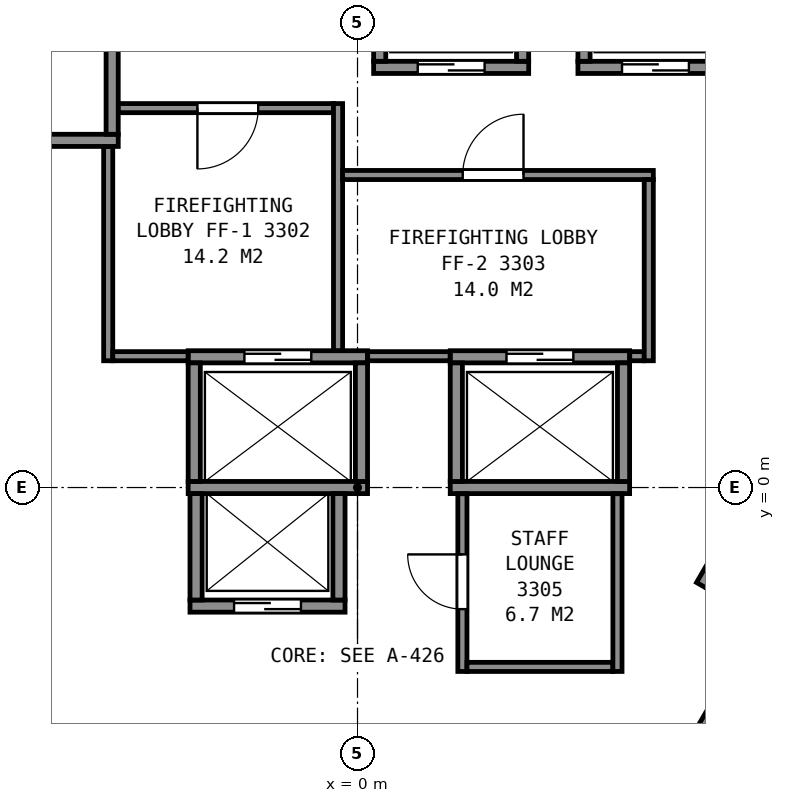
"""IFC4 building model, lengths in metres.
Left out: names, types, materials, properties, quantities, classifications, styles, units other than length and angle.
Written with IfcOpenShell. Run it as: python <this file> out.ifc"""

import sys

from ifc_helpers import new_model, si_unit, direction, frame, frame_2d, origin, place, context, subcontext, project, spatial, rectangle, extrude, element, fill, save


model = new_model("IFC4")
c1 = context("Model", 3, precision=1e-05, world=origin(), true_north=direction((0.0, 1.0)))
c2 = subcontext(c1, "Body", "Model", "MODEL_VIEW")
j1 = project(units=[si_unit("LENGTHUNIT", "METRE"), si_unit("PLANEANGLEUNIT", "RADIAN")], contexts=[c1])
p1 = place(None, origin())
s1 = spatial("IfcSite", under=j1, at=p1, CompositionType="ELEMENT")
p2 = place(p1, origin())
s2 = spatial("IfcBuilding", under=s1, at=p2, CompositionType="ELEMENT")
p3 = place(p2, frame((0.0, 0.0, 136.0)))
s3 = spatial("IfcBuildingStorey", under=s2, at=p3, CompositionType="ELEMENT", Elevation=136.0)
p4 = place(p3, frame((-2.755, -1.95, 0.0), z_axis=(0.0, 0.0, 1.0), x_axis=(1.0, 0.0, 0.0)))
e1 = element("IfcWall", 1, at=p4, inside=s3, PredefinedType="PARTITIONING", context=c2, shape_type="SweptSolid", body=[
    extrude(rectangle(XDim=2.55, YDim=0.2, at=frame_2d((1.275, 0.0))), origin(), (0.0, 0.0, 1.0), 3.6),
])
p5 = place(p4, frame((0.725, 0.0, 0.0)))
e2 = element("IfcOpeningElement", 2, at=p5, cuts=e1, PredefinedType="OPENING", context=c2, shape_type="SweptSolid", body=[
    extrude(rectangle(XDim=1.1, YDim=2.1, at=frame_2d((0.55, 1.05))), frame((0.0, 0.11, 0.0), z_axis=(0.0, -1.0, 0.0), x_axis=(1.0, 0.0, 0.0)), (0.0, 0.0, 1.0), 0.22),
])
p6 = place(p3, frame((-2.785, 0.0, 0.0), z_axis=(0.0, 0.0, 1.0), x_axis=(1.0, 0.0, 0.0)))
e3 = element("IfcWall", 3, at=p6, inside=s3, PredefinedType="PARTITIONING", context=c2, shape_type="SweptSolid", body=[
    extrude(rectangle(XDim=2.95, YDim=0.2, at=frame_2d((1.475, 0.0))), origin(), (0.0, 0.0, 1.0), 3.6),
])
p7 = place(p3, frame((1.525, 0.0, 0.0), z_axis=(0.0, 0.0, 1.0), x_axis=(1.0, 0.0, 0.0)))
e4 = element("IfcWall", 4, at=p7, inside=s3, PredefinedType="PARTITIONING", context=c2, shape_type="SweptSolid", body=[
    extrude(rectangle(XDim=2.95, YDim=0.2, at=frame_2d((1.475, 0.0))), origin(), (0.0, 0.0, 1.0), 3.6),
])
p8 = place(p3, frame((-2.785, 2.15, 0.0), z_axis=(0.0, 0.0, 1.0), x_axis=(1.0, 0.0, 0.0)))
e5 = element("IfcWall", 5, at=p8, inside=s3, PredefinedType="PARTITIONING", context=c2, shape_type="SweptSolid", body=[
    extrude(rectangle(XDim=2.95, YDim=0.2, at=frame_2d((1.475, 0.0))), origin(), (0.0, 0.0, 1.0), 3.6),
])
p9 = place(p8, frame((0.925, 0.0, 0.0)))
e6 = element("IfcOpeningElement", 6, at=p9, cuts=e5, PredefinedType="OPENING", context=c2, shape_type="SweptSolid", body=[
    extrude(rectangle(XDim=1.1, YDim=2.1, at=frame_2d((0.55, 1.05))), frame((0.0, 0.11, 0.0), z_axis=(0.0, -1.0, 0.0), x_axis=(1.0, 0.0, 0.0)), (0.0, 0.0, 1.0), 0.22),
])
p10 = place(p3, frame((1.525, 2.15, 0.0), z_axis=(0.0, 0.0, 1.0), x_axis=(1.0, 0.0, 0.0)))
e7 = element("IfcWall", 7, at=p10, inside=s3, PredefinedType="PARTITIONING", context=c2, shape_type="SweptSolid", body=[
    extrude(rectangle(XDim=2.95, YDim=0.2, at=frame_2d((1.475, 0.0))), origin(), (0.0, 0.0, 1.0), 3.6),
])
p11 = place(p10, frame((0.925, 0.0, 0.0)))
e8 = element("IfcOpeningElement", 8, at=p11, cuts=e7, PredefinedType="OPENING", context=c2, shape_type="SweptSolid", body=[
    extrude(rectangle(XDim=1.1, YDim=2.1, at=frame_2d((0.55, 1.05))), frame((0.0, 0.11, 0.0), z_axis=(0.0, -1.0, 0.0), x_axis=(1.0, 0.0, 0.0)), (0.0, 0.0, 1.0), 0.22),
])
p12 = place(p3, frame((-6.285, 5.71, 0.0), z_axis=(0.0, 0.0, 1.0), x_axis=(1.0, 0.0, 0.0)))
e9 = element("IfcWall", 9, at=p12, inside=s3, PredefinedType="PARTITIONING", context=c2, shape_type="SweptSolid", body=[
    extrude(rectangle(XDim=2.35, YDim=0.2, at=frame_2d((1.175, 0.0))), origin(), (0.0, 0.0, 1.0), 3.6),
])
p13 = place(p3, frame((0.265, 6.91, 0.0), z_axis=(0.0, 0.0, 1.0), x_axis=(1.0, 0.0, 0.0)))
e10 = element("IfcWall", 10, at=p13, inside=s3, PredefinedType="PARTITIONING", context=c2, shape_type="SweptSolid", body=[
    extrude(rectangle(XDim=2.55, YDim=0.2, at=frame_2d((1.275, 0.0))), origin(), (0.0, 0.0, 1.0), 3.6),
])
p14 = place(p13, frame((0.725, 0.0, 0.0)))
e11 = element("IfcOpeningElement", 11, at=p14, cuts=e10, PredefinedType="OPENING", context=c2, shape_type="SweptSolid", body=[
    extrude(rectangle(XDim=1.1, YDim=2.1, at=frame_2d((0.55, 1.05))), frame((0.0, 0.11, 0.0), z_axis=(0.0, -1.0, 0.0), x_axis=(1.0, 0.0, 0.0)), (0.0, 0.0, 1.0), 0.22),
])
p15 = place(p3, frame((3.625, 6.91, 0.0), z_axis=(0.0, 0.0, 1.0), x_axis=(1.0, 0.0, 0.0)))
e12 = element("IfcWall", 12, at=p15, inside=s3, PredefinedType="PARTITIONING", context=c2, shape_type="SweptSolid", body=[
    extrude(rectangle(XDim=2.55, YDim=0.2, at=frame_2d((1.275, 0.0))), origin(), (0.0, 0.0, 1.0), 3.6),
])
p16 = place(p15, frame((0.725, 0.0, 0.0)))
e13 = element("IfcOpeningElement", 13, at=p16, cuts=e12, PredefinedType="OPENING", context=c2, shape_type="SweptSolid", body=[
    extrude(rectangle(XDim=1.1, YDim=2.1, at=frame_2d((0.55, 1.05))), frame((0.0, 0.11, 0.0), z_axis=(0.0, -1.0, 0.0), x_axis=(1.0, 0.0, 0.0)), (0.0, 0.0, 1.0), 0.22),
])
p17 = place(p3, frame((5.527, -4.247, 0.0), z_axis=(0.0, 0.0, 1.0), x_axis=(0.499938297808, 0.866061024631, 0.0)))
e14 = element("IfcWall", 14, at=p17, inside=s3, PredefinedType="PARTITIONING", context=c2, shape_type="SweptSolid", body=[
    extrude(rectangle(XDim=2.35, YDim=0.2, at=frame_2d((1.175, 0.0))), origin(), (0.0, 0.0, 1.0), 3.6),
])
p18 = place(p17, frame((0.725, 0.0, 0.0)))
e15 = element("IfcOpeningElement", 15, at=p18, cuts=e14, PredefinedType="OPENING", context=c2, shape_type="SweptSolid", body=[
    extrude(rectangle(XDim=1.1, YDim=2.1, at=frame_2d((0.55, 1.05))), frame((0.0, 0.11, 0.0), z_axis=(0.0, -1.0, 0.0), x_axis=(1.0, 0.0, 0.0)), (0.0, 0.0, 1.0), 0.22),
])
p19 = place(p3, frame((5.663, -1.612, 0.0), z_axis=(0.0, 0.0, 1.0), x_axis=(0.49998122708, 0.866036242063, 0.0)))
e16 = element("IfcWall", 16, at=p19, inside=s3, PredefinedType="PARTITIONING", context=c2, shape_type="SweptSolid", body=[
    extrude(rectangle(XDim=4.9, YDim=0.2, at=frame_2d((2.45, 0.0))), origin(), (0.0, 0.0, 1.0), 3.6),
])
p20 = place(p3, frame((4.375, 0.1, 0.0), z_axis=(0.0, 0.0, 1.0), x_axis=(0.0, 1.0, 0.0)))
e17 = element("IfcWall", 17, at=p20, inside=s3, PredefinedType="PARTITIONING", context=c2, shape_type="SweptSolid", body=[
    extrude(rectangle(XDim=1.95, YDim=0.2, at=frame_2d((0.975, 0.0))), origin(), (0.0, 0.0, 1.0), 3.6),
])
for number, where, z_axis, x_axis in (
    (18, (3.725, 7.01, 0.0), (0.0, 0.0, 1.0), (0.0, 1.0, 0.0)),
    (19, (2.715, 7.01, 0.0), (0.0, 0.0, 1.0), (0.0, 1.0, 0.0)),
):
    element("IfcWall", number, at=place(p3, frame(where, z_axis=z_axis, x_axis=x_axis)), inside=s3, PredefinedType="PARTITIONING", context=c2, shape_type="SweptSolid", body=[
        extrude(rectangle(XDim=1.75, YDim=0.2, at=frame_2d((0.875, 0.0))), origin(), (0.0, 0.0, 1.0), 3.6),
    ])
p21 = place(p3, frame((1.625, 0.1, 0.0), z_axis=(0.0, 0.0, 1.0), x_axis=(0.0, 1.0, 0.0)))
e20 = element("IfcWall", 20, at=p21, inside=s3, PredefinedType="PARTITIONING", context=c2, shape_type="SweptSolid", body=[
    extrude(rectangle(XDim=1.95, YDim=0.2, at=frame_2d((0.975, 0.0))), origin(), (0.0, 0.0, 1.0), 3.6),
])
p22 = place(p3, frame((0.365, 7.01, 0.0), z_axis=(0.0, 0.0, 1.0), x_axis=(0.0, 1.0, 0.0)))
e21 = element("IfcWall", 21, at=p22, inside=s3, PredefinedType="PARTITIONING", context=c2, shape_type="SweptSolid", body=[
    extrude(rectangle(XDim=1.75, YDim=0.2, at=frame_2d((0.875, 0.0))), origin(), (0.0, 0.0, 1.0), 3.6),
])
p23 = place(p3, frame((0.065, 0.1, 0.0), z_axis=(0.0, 0.0, 1.0), x_axis=(0.0, 1.0, 0.0)))
e22 = element("IfcWall", 22, at=p23, inside=s3, PredefinedType="PARTITIONING", context=c2, shape_type="SweptSolid", body=[
    extrude(rectangle(XDim=1.95, YDim=0.2, at=frame_2d((0.975, 0.0))), origin(), (0.0, 0.0, 1.0), 3.6),
])
for number, where, z_axis, x_axis in (
    (23, (-0.305, -1.85, 0.0), (0.0, 0.0, 1.0), (0.0, 1.0, 0.0)),
    (24, (-2.655, -1.85, 0.0), (0.0, 0.0, 1.0), (0.0, 1.0, 0.0)),
):
    element("IfcWall", number, at=place(p3, frame(where, z_axis=z_axis, x_axis=x_axis)), inside=s3, PredefinedType="PARTITIONING", context=c2, shape_type="SweptSolid", body=[
        extrude(rectangle(XDim=1.75, YDim=0.2, at=frame_2d((0.875, 0.0))), origin(), (0.0, 0.0, 1.0), 3.6),
    ])
p24 = place(p3, frame((-2.685, 0.1, 0.0), z_axis=(0.0, 0.0, 1.0), x_axis=(0.0, 1.0, 0.0)))
e25 = element("IfcWall", 25, at=p24, inside=s3, PredefinedType="PARTITIONING", context=c2, shape_type="SweptSolid", body=[
    extrude(rectangle(XDim=1.95, YDim=0.2, at=frame_2d((0.975, 0.0))), origin(), (0.0, 0.0, 1.0), 3.6),
])
p25 = place(p3, frame((-4.035, 5.81, 0.0), z_axis=(0.0, 0.0, 1.0), x_axis=(0.0, 1.0, 0.0)))
e26 = element("IfcWall", 26, at=p25, inside=s3, PredefinedType="PARTITIONING", context=c2, shape_type="SweptSolid", body=[
    extrude(rectangle(XDim=1.75, YDim=0.2, at=frame_2d((0.875, 0.0))), origin(), (0.0, 0.0, 1.0), 3.6),
])
p26 = place(p3, frame((-13.664, 5.946, 0.0), z_axis=(0.0, 0.0, 1.0), x_axis=(0.499994327219, -0.866028678941, 0.0)))
e27 = element("IfcWall", 27, at=p26, inside=s3, PredefinedType="PARTITIONING", context=c2, shape_type="SweptSolid", body=[
    extrude(rectangle(XDim=23.968, YDim=0.2, at=frame_2d((11.984, 0.0))), origin(), (0.0, 0.0, 1.0), 3.35),
])
p27 = place(p3, frame((-4.152, -5.729, 0.0), z_axis=(0.0, 0.0, 1.0), x_axis=(-0.500024287448, 0.866011380966, 0.0)))
e28 = element("IfcWall", 28, at=p27, inside=s3, PredefinedType="PARTITIONING", context=c2, shape_type="SweptSolid", body=[
    extrude(rectangle(XDim=3.501, YDim=0.15, at=frame_2d((1.75, 0.0))), origin(), (0.0, 0.0, 1.0), 3.35),
])
p28 = place(p27, frame((2.026, 0.0, 0.0)))
e29 = element("IfcOpeningElement", 29, at=p28, cuts=e28, PredefinedType="OPENING", context=c2, shape_type="SweptSolid", body=[
    extrude(rectangle(XDim=0.9, YDim=2.1, at=frame_2d((0.45, 1.05))), frame((0.0, 0.085, 0.0), z_axis=(0.0, -1.0, 0.0), x_axis=(1.0, 0.0, 0.0)), (0.0, 0.0, 1.0), 0.17),
])
p29 = place(p27, frame((0.248, 0.0, 0.0)))
e30 = element("IfcOpeningElement", 30, at=p29, cuts=e28, PredefinedType="OPENING", context=c2, shape_type="SweptSolid", body=[
    extrude(rectangle(XDim=0.9, YDim=2.1, at=frame_2d((0.45, 1.05))), frame((0.0, 0.085, 0.0), z_axis=(0.0, -1.0, 0.0), x_axis=(1.0, 0.0, 0.0)), (0.0, 0.0, 1.0), 0.17),
])
p30 = place(p3, frame((-4.1, 2.085, 0.0), z_axis=(0.0, 0.0, 1.0), x_axis=(0.0, 1.0, 0.0)))
e31 = element("IfcWall", 31, at=p30, inside=s3, PredefinedType="PARTITIONING", context=c2, shape_type="SweptSolid", body=[
    extrude(rectangle(XDim=3.523, YDim=0.15, at=frame_2d((1.761, 0.0))), origin(), (0.0, 0.0, 1.0), 3.35),
])
p31 = place(p3, frame((-4.025, 2.16, 0.0), z_axis=(0.0, 0.0, 1.0), x_axis=(1.0, 0.0, 0.0)))
e32 = element("IfcWall", 32, at=p31, inside=s3, PredefinedType="PARTITIONING", context=c2, shape_type="SweptSolid", body=[
    extrude(rectangle(XDim=1.238, YDim=0.15, at=frame_2d((0.619, 0.0))), origin(), (0.0, 0.0, 1.0), 3.35),
])
p32 = place(p3, frame((-3.933, 6.24, 0.0), z_axis=(0.0, 0.0, 1.0), x_axis=(1.0, 0.0, 0.0)))
e33 = element("IfcWall", 33, at=p32, inside=s3, PredefinedType="PARTITIONING", context=c2, shape_type="SweptSolid", body=[
    extrude(rectangle(XDim=3.538, YDim=0.15, at=frame_2d((1.769, 0.0))), origin(), (0.0, 0.0, 1.0), 3.35),
])
p33 = place(p32, frame((1.3, 0.0, 0.0)))
e34 = element("IfcOpeningElement", 34, at=p33, cuts=e33, PredefinedType="OPENING", context=c2, shape_type="SweptSolid", body=[
    extrude(rectangle(XDim=1.0, YDim=2.1, at=frame_2d((0.5, 1.05))), frame((0.0, 0.085, 0.0), z_axis=(0.0, -1.0, 0.0), x_axis=(1.0, 0.0, 0.0)), (0.0, 0.0, 1.0), 0.17),
])
p34 = place(p3, frame((-0.32, 2.252, 0.0), z_axis=(0.0, 0.0, 1.0), x_axis=(0.0, 1.0, 0.0)))
e35 = element("IfcWall", 35, at=p34, inside=s3, PredefinedType="PARTITIONING", context=c2, shape_type="SweptSolid", body=[
    extrude(rectangle(XDim=4.063, YDim=0.15, at=frame_2d((2.031, 0.0))), origin(), (0.0, 0.0, 1.0), 3.35),
])
p35 = place(p3, frame((-0.245, 5.14, 0.0), z_axis=(0.0, 0.0, 1.0), x_axis=(1.0, 0.0, 0.0)))
e36 = element("IfcWall", 36, at=p35, inside=s3, PredefinedType="PARTITIONING", context=c2, shape_type="SweptSolid", body=[
    extrude(rectangle(XDim=5.11, YDim=0.15, at=frame_2d((2.555, 0.0))), origin(), (0.0, 0.0, 1.0), 3.35),
])
p36 = place(p35, frame((1.975, 0.0, 0.0)))
e37 = element("IfcOpeningElement", 37, at=p36, cuts=e36, PredefinedType="OPENING", context=c2, shape_type="SweptSolid", body=[
    extrude(rectangle(XDim=1.0, YDim=2.1, at=frame_2d((0.5, 1.05))), frame((0.0, 0.085, 0.0), z_axis=(0.0, -1.0, 0.0), x_axis=(1.0, 0.0, 0.0)), (0.0, 0.0, 1.0), 0.17),
])
p37 = place(p3, frame((0.167, 2.16, 0.0), z_axis=(0.0, 0.0, 1.0), x_axis=(1.0, 0.0, 0.0)))
e38 = element("IfcWall", 38, at=p37, inside=s3, PredefinedType="PARTITIONING", context=c2, shape_type="SweptSolid", body=[
    extrude(rectangle(XDim=1.356, YDim=0.15, at=frame_2d((0.678, 0.0))), origin(), (0.0, 0.0, 1.0), 3.35),
])
p38 = place(p3, frame((1.725, -0.102, 0.0), z_axis=(0.0, 0.0, 1.0), x_axis=(0.0, -1.0, 0.0)))
e39 = element("IfcWall", 39, at=p38, inside=s3, PredefinedType="PARTITIONING", context=c2, shape_type="SweptSolid", body=[
    extrude(rectangle(XDim=2.923, YDim=0.15, at=frame_2d((1.461, 0.0))), origin(), (0.0, 0.0, 1.0), 3.35),
])
p39 = place(p38, frame((0.998, 0.0, 0.0)))
e40 = element("IfcOpeningElement", 40, at=p39, cuts=e39, PredefinedType="OPENING", context=c2, shape_type="SweptSolid", body=[
    extrude(rectangle(XDim=0.9, YDim=2.1, at=frame_2d((0.45, 1.05))), frame((0.0, 0.085, 0.0), z_axis=(0.0, -1.0, 0.0), x_axis=(1.0, 0.0, 0.0)), (0.0, 0.0, 1.0), 0.17),
])
p40 = place(p3, frame((1.8, -2.95, 0.0), z_axis=(0.0, 0.0, 1.0), x_axis=(1.0, 0.0, 0.0)))
e41 = element("IfcWall", 41, at=p40, inside=s3, PredefinedType="PARTITIONING", context=c2, shape_type="SweptSolid", body=[
    extrude(rectangle(XDim=2.4, YDim=0.15, at=frame_2d((1.2, 0.0))), origin(), (0.0, 0.0, 1.0), 3.35),
])
p41 = place(p3, frame((4.275, -3.025, 0.0), z_axis=(0.0, 0.0, 1.0), x_axis=(0.0, 1.0, 0.0)))
e42 = element("IfcWall", 42, at=p41, inside=s3, PredefinedType="PARTITIONING", context=c2, shape_type="SweptSolid", body=[
    extrude(rectangle(XDim=2.923, YDim=0.15, at=frame_2d((1.461, 0.0))), origin(), (0.0, 0.0, 1.0), 3.35),
])
p42 = place(p3, frame((4.477, 2.16, 0.0), z_axis=(0.0, 0.0, 1.0), x_axis=(1.0, 0.0, 0.0)))
e43 = element("IfcWall", 43, at=p42, inside=s3, PredefinedType="PARTITIONING", context=c2, shape_type="SweptSolid", body=[
    extrude(rectangle(XDim=0.238, YDim=0.15, at=frame_2d((0.119, 0.0))), origin(), (0.0, 0.0, 1.0), 3.35),
])
p43 = place(p3, frame((4.79, 2.085, 0.0), z_axis=(0.0, 0.0, 1.0), x_axis=(0.0, 1.0, 0.0)))
e44 = element("IfcWall", 44, at=p43, inside=s3, PredefinedType="PARTITIONING", context=c2, shape_type="SweptSolid", body=[
    extrude(rectangle(XDim=2.98, YDim=0.15, at=frame_2d((1.49, 0.0))), origin(), (0.0, 0.0, 1.0), 3.35),
])
p44 = place(p3, frame((-3.756, -15.816, 0.0), z_axis=(0.0, 0.0, 1.0), x_axis=(-0.499992829944, 0.866029543379, 0.0)))
e45 = element("IfcWall", 45, at=p44, inside=s3, PredefinedType="PARTITIONING", context=c2, shape_type="SweptSolid", body=[
    extrude(rectangle(XDim=24.413, YDim=0.125, at=frame_2d((12.207, 0.0))), origin(), (0.0, 0.0, 1.0), 2.613),
])
p45 = place(p44, frame((20.478, 0.0, 0.0)))
e46 = element("IfcOpeningElement", 46, at=p45, cuts=e45, PredefinedType="OPENING", context=c2, shape_type="SweptSolid", body=[
    extrude(rectangle(XDim=1.0, YDim=2.1, at=frame_2d((0.5, 1.05))), frame((0.0, 0.073, 0.0), z_axis=(0.0, -1.0, 0.0), x_axis=(1.0, 0.0, 0.0)), (0.0, 0.0, 1.0), 0.145),
])
p46 = place(p44, frame((5.99, 0.0, 0.0)))
e47 = element("IfcOpeningElement", 47, at=p46, cuts=e45, PredefinedType="OPENING", context=c2, shape_type="SweptSolid", body=[
    extrude(rectangle(XDim=1.0, YDim=2.1, at=frame_2d((0.5, 1.05))), frame((0.0, 0.073, 0.0), z_axis=(0.0, -1.0, 0.0), x_axis=(1.0, 0.0, 0.0)), (0.0, 0.0, 1.0), 0.145),
])
p47 = place(p44, frame((1.561, 0.0, 0.0)))
e48 = element("IfcOpeningElement", 48, at=p47, cuts=e45, PredefinedType="OPENING", context=c2, shape_type="SweptSolid", body=[
    extrude(rectangle(XDim=1.0, YDim=2.1, at=frame_2d((0.5, 1.05))), frame((0.0, 0.073, 0.0), z_axis=(0.0, -1.0, 0.0), x_axis=(1.0, 0.0, 0.0)), (0.0, 0.0, 1.0), 0.145),
])
p48 = place(p3, frame((15.962, 5.326, 0.0), z_axis=(0.0, 0.0, 1.0), x_axis=(-0.499992829944, -0.866029543379, 0.0)))
e49 = element("IfcWall", 49, at=p48, inside=s3, PredefinedType="PARTITIONING", context=c2, shape_type="SweptSolid", body=[
    extrude(rectangle(XDim=24.413, YDim=0.125, at=frame_2d((12.207, 0.0))), origin(), (0.0, 0.0, 1.0), 2.613),
])
p49 = place(p48, frame((21.258, 0.0, 0.0)))
e50 = element("IfcOpeningElement", 50, at=p49, cuts=e49, PredefinedType="OPENING", context=c2, shape_type="SweptSolid", body=[
    extrude(rectangle(XDim=0.9, YDim=2.1, at=frame_2d((0.45, 1.05))), frame((0.0, 0.073, 0.0), z_axis=(0.0, -1.0, 0.0), x_axis=(1.0, 0.0, 0.0)), (0.0, 0.0, 1.0), 0.145),
])
p50 = place(p48, frame((18.502, 0.0, 0.0)))
e51 = element("IfcOpeningElement", 51, at=p50, cuts=e49, PredefinedType="OPENING", context=c2, shape_type="SweptSolid", body=[
    extrude(rectangle(XDim=0.9, YDim=2.1, at=frame_2d((0.45, 1.05))), frame((0.0, 0.073, 0.0), z_axis=(0.0, -1.0, 0.0), x_axis=(1.0, 0.0, 0.0)), (0.0, 0.0, 1.0), 0.145),
])
p51 = place(p48, frame((11.799, 0.0, 0.0)))
e52 = element("IfcOpeningElement", 52, at=p51, cuts=e49, PredefinedType="OPENING", context=c2, shape_type="SweptSolid", body=[
    extrude(rectangle(XDim=0.9, YDim=2.1, at=frame_2d((0.45, 1.05))), frame((0.0, 0.073, 0.0), z_axis=(0.0, -1.0, 0.0), x_axis=(1.0, 0.0, 0.0)), (0.0, 0.0, 1.0), 0.145),
])
p52 = place(p48, frame((9.043, 0.0, 0.0)))
e53 = element("IfcOpeningElement", 53, at=p52, cuts=e49, PredefinedType="OPENING", context=c2, shape_type="SweptSolid", body=[
    extrude(rectangle(XDim=0.9, YDim=2.1, at=frame_2d((0.45, 1.05))), frame((0.0, 0.073, 0.0), z_axis=(0.0, -1.0, 0.0), x_axis=(1.0, 0.0, 0.0)), (0.0, 0.0, 1.0), 0.145),
])
p53 = place(p48, frame((1.99, 0.0, 0.0)))
e54 = element("IfcOpeningElement", 54, at=p53, cuts=e49, PredefinedType="OPENING", context=c2, shape_type="SweptSolid", body=[
    extrude(rectangle(XDim=0.9, YDim=2.1, at=frame_2d((0.45, 1.05))), frame((0.0, 0.073, 0.0), z_axis=(0.0, -1.0, 0.0), x_axis=(1.0, 0.0, 0.0)), (0.0, 0.0, 1.0), 0.145),
])
p54 = place(p14, origin())
e55 = element("IfcDoor", 55, at=p54, inside=s3, OperationType="SLIDING_TO_LEFT", PredefinedType="DOOR", context=c2, shape_type="SweptSolid", body=[
    extrude(rectangle(XDim=1.1, YDim=2.1, at=frame_2d((0.55, 1.05))), frame((0.0, 0.025, 0.0), z_axis=(0.0, -1.0, 0.0), x_axis=(1.0, 0.0, 0.0)), (0.0, 0.0, 1.0), 0.05),
])
fill(e11, e55)
p55 = place(p5, origin())
e56 = element("IfcDoor", 56, at=p55, inside=s3, OperationType="SLIDING_TO_RIGHT", PredefinedType="DOOR", context=c2, shape_type="SweptSolid", body=[
    extrude(rectangle(XDim=1.1, YDim=2.1, at=frame_2d((0.55, 1.05))), frame((0.0, 0.025, 0.0), z_axis=(0.0, -1.0, 0.0), x_axis=(1.0, 0.0, 0.0)), (0.0, 0.0, 1.0), 0.05),
])
fill(e2, e56)
p56 = place(p16, origin())
e57 = element("IfcDoor", 57, at=p56, inside=s3, OperationType="SLIDING_TO_LEFT", PredefinedType="DOOR", context=c2, shape_type="SweptSolid", body=[
    extrude(rectangle(XDim=1.1, YDim=2.1, at=frame_2d((0.55, 1.05))), frame((0.0, 0.025, 0.0), z_axis=(0.0, -1.0, 0.0), x_axis=(1.0, 0.0, 0.0)), (0.0, 0.0, 1.0), 0.05),
])
fill(e13, e57)
p57 = place(p9, origin())
e58 = element("IfcDoor", 58, at=p57, inside=s3, OperationType="SLIDING_TO_LEFT", PredefinedType="DOOR", context=c2, shape_type="SweptSolid", body=[
    extrude(rectangle(XDim=1.1, YDim=2.1, at=frame_2d((0.55, 1.05))), frame((0.0, 0.025, 0.0), z_axis=(0.0, -1.0, 0.0), x_axis=(1.0, 0.0, 0.0)), (0.0, 0.0, 1.0), 0.05),
])
fill(e6, e58)
p58 = place(p11, origin())
e59 = element("IfcDoor", 59, at=p58, inside=s3, OperationType="SLIDING_TO_RIGHT", PredefinedType="DOOR", context=c2, shape_type="SweptSolid", body=[
    extrude(rectangle(XDim=1.1, YDim=2.1, at=frame_2d((0.55, 1.05))), frame((0.0, 0.025, 0.0), z_axis=(0.0, -1.0, 0.0), x_axis=(1.0, 0.0, 0.0)), (0.0, 0.0, 1.0), 0.05),
])
fill(e8, e59)
p59 = place(p33, origin())
e60 = element("IfcDoor", 60, at=p59, inside=s3, OperationType="SINGLE_SWING_LEFT", PredefinedType="DOOR", context=c2, shape_type="SweptSolid", body=[
    extrude(rectangle(XDim=1.0, YDim=2.1, at=frame_2d((0.5, 1.05))), frame((0.0, 0.025, 0.0), z_axis=(0.0, -1.0, 0.0), x_axis=(1.0, 0.0, 0.0)), (0.0, 0.0, 1.0), 0.05),
])
fill(e34, e60)
p60 = place(p36, origin())
e61 = element("IfcDoor", 61, at=p60, inside=s3, OperationType="SINGLE_SWING_RIGHT", PredefinedType="DOOR", context=c2, shape_type="SweptSolid", body=[
    extrude(rectangle(XDim=1.0, YDim=2.1, at=frame_2d((0.5, 1.05))), frame((0.0, 0.025, 0.0), z_axis=(0.0, -1.0, 0.0), x_axis=(1.0, 0.0, 0.0)), (0.0, 0.0, 1.0), 0.05),
])
fill(e37, e61)
p61 = place(p39, origin())
e62 = element("IfcDoor", 62, at=p61, inside=s3, OperationType="SINGLE_SWING_LEFT", PredefinedType="DOOR", context=c2, shape_type="SweptSolid", body=[
    extrude(rectangle(XDim=0.9, YDim=2.1, at=frame_2d((0.45, 1.05))), frame((0.0, 0.025, 0.0), z_axis=(0.0, -1.0, 0.0), x_axis=(1.0, 0.0, 0.0)), (0.0, 0.0, 1.0), 0.05),
])
fill(e40, e62)
save(model, sys.argv[1])
